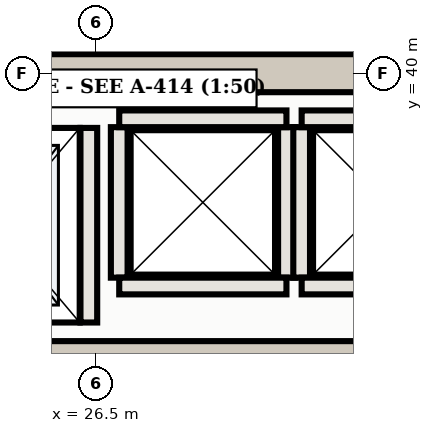
"""IFC4 building model, lengths in metres.
Left out: names, types, materials, properties, quantities, classifications, styles, units other than length and angle.
Written with IfcOpenShell. Run it as: python <this file> out.ifc"""

import sys

from ifc_helpers import new_model, si_unit, direction, frame, frame_2d, origin, place, context, subcontext, project, spatial, rectangle, extrude, element, save


model = new_model("IFC4")
c1 = context("Model", 3, precision=1e-05, world=origin(), true_north=direction((0.0, 1.0)))
c2 = subcontext(c1, "Body", "Model", "MODEL_VIEW")
j1 = project(units=[si_unit("LENGTHUNIT", "METRE"), si_unit("PLANEANGLEUNIT", "RADIAN")], contexts=[c1])
p1 = place(None, origin())
s1 = spatial("IfcSite", under=j1, at=p1, CompositionType="ELEMENT")
p2 = place(p1, origin())
s2 = spatial("IfcBuilding", under=s1, at=p2, CompositionType="ELEMENT")
p3 = place(p2, frame((0.0, 0.0, 223.1)))
s3 = spatial("IfcBuildingStorey", under=s2, at=p3, CompositionType="ELEMENT", Elevation=223.1)
p4 = place(p3, frame((10.35, 40.0, 0.0), z_axis=(0.0, 0.0, 1.0), x_axis=(1.0, 0.0, 0.0)))
e1 = element("IfcWall", 1, at=p4, inside=s3, PredefinedType="SHEAR", context=c2, shape_type="SweptSolid", body=[
    extrude(rectangle(XDim=32.3, YDim=0.5, at=frame_2d((16.15, 0.0))), origin(), (0.0, 0.0, 1.0), 3.11),
])
p5 = place(p3, frame((15.5, 36.3, 0.0), z_axis=(0.0, 0.0, 1.0), x_axis=(1.0, 0.0, 0.0)))
e2 = element("IfcWall", 2, at=p5, inside=s3, PredefinedType="SHEAR", context=c2, shape_type="SweptSolid", body=[
    extrude(rectangle(XDim=22.0, YDim=0.35, at=frame_2d((11.0, 0.0))), origin(), (0.0, 0.0, 1.0), 3.11),
])
p6 = place(p5, frame((0.65, 0.0, 0.0)))
e3 = element("IfcOpeningElement", 3, at=p6, cuts=e2, PredefinedType="OPENING", context=c2, shape_type="SweptSolid", body=[
    extrude(rectangle(XDim=1.1, YDim=2.15, at=frame_2d((0.55, 1.075))), frame((0.0, 0.185, 0.0), z_axis=(0.0, -1.0, 0.0), x_axis=(1.0, 0.0, 0.0)), (0.0, 0.0, 1.0), 0.37),
])
p7 = place(p5, frame((20.25, 0.0, 0.0)))
e4 = element("IfcOpeningElement", 4, at=p7, cuts=e2, PredefinedType="OPENING", context=c2, shape_type="SweptSolid", body=[
    extrude(rectangle(XDim=1.1, YDim=2.15, at=frame_2d((0.55, 1.075))), frame((0.0, 0.185, 0.0), z_axis=(0.0, -1.0, 0.0), x_axis=(1.0, 0.0, 0.0)), (0.0, 0.0, 1.0), 0.37),
])
p8 = place(p5, frame((17.05, 0.0, 0.0)))
e5 = element("IfcOpeningElement", 5, at=p8, cuts=e2, PredefinedType="OPENING", context=c2, shape_type="SweptSolid", body=[
    extrude(rectangle(XDim=1.3, YDim=2.2, at=frame_2d((0.65, 1.1))), frame((0.0, 0.185, 0.0), z_axis=(0.0, -1.0, 0.0), x_axis=(1.0, 0.0, 0.0)), (0.0, 0.0, 1.0), 0.37),
])
p9 = place(p5, frame((3.95, 0.0, 0.0)))
e6 = element("IfcOpeningElement", 6, at=p9, cuts=e2, PredefinedType="OPENING", context=c2, shape_type="SweptSolid", body=[
    extrude(rectangle(XDim=1.1, YDim=2.15, at=frame_2d((0.55, 1.075))), frame((0.0, 0.185, 0.0), z_axis=(0.0, -1.0, 0.0), x_axis=(1.0, 0.0, 0.0)), (0.0, 0.0, 1.0), 0.37),
])
p10 = place(p5, frame((6.55, 0.0, 0.0)))
e7 = element("IfcOpeningElement", 7, at=p10, cuts=e2, PredefinedType="OPENING", context=c2, shape_type="SweptSolid", body=[
    extrude(rectangle(XDim=1.1, YDim=2.15, at=frame_2d((0.55, 1.075))), frame((0.0, 0.185, 0.0), z_axis=(0.0, -1.0, 0.0), x_axis=(1.0, 0.0, 0.0)), (0.0, 0.0, 1.0), 0.37),
])
p11 = place(p5, frame((9.15, 0.0, 0.0)))
e8 = element("IfcOpeningElement", 8, at=p11, cuts=e2, PredefinedType="OPENING", context=c2, shape_type="SweptSolid", body=[
    extrude(rectangle(XDim=1.1, YDim=2.15, at=frame_2d((0.55, 1.075))), frame((0.0, 0.185, 0.0), z_axis=(0.0, -1.0, 0.0), x_axis=(1.0, 0.0, 0.0)), (0.0, 0.0, 1.0), 0.37),
])
p12 = place(p3, frame((26.4, 36.72, 0.0), z_axis=(0.0, 0.0, 1.0), x_axis=(0.0, 1.0, 0.0)))
e9 = element("IfcWall", 9, at=p12, inside=s3, PredefinedType="SOLIDWALL", context=c2, shape_type="SweptSolid", body=[
    extrude(rectangle(XDim=2.56, YDim=0.22, at=frame_2d((1.28, 0.0))), origin(), (0.0, 0.0, 1.0), 3.11),
])
for number, where, z_axis, x_axis in (
    (10, (26.8, 37.31, 0.0), (0.0, 0.0, 1.0), (0.0, 1.0, 0.0)),
    (11, (29.0, 37.31, 0.0), (0.0, 0.0, 1.0), (0.0, 1.0, 0.0)),
):
    element("IfcWall", number, at=place(p3, frame(where, z_axis=z_axis, x_axis=x_axis)), inside=s3, PredefinedType="SOLIDWALL", context=c2, shape_type="SweptSolid", body=[
        extrude(rectangle(XDim=1.98, YDim=0.22, at=frame_2d((0.99, 0.0))), origin(), (0.0, 0.0, 1.0), 3.11),
    ])
for number, where, z_axis, x_axis in (
    (12, (26.8, 39.4, 0.0), (0.0, 0.0, 1.0), (1.0, 0.0, 0.0)),
    (13, (26.8, 37.2, 0.0), (0.0, 0.0, 1.0), (1.0, 0.0, 0.0)),
):
    element("IfcWall", number, at=place(p3, frame(where, z_axis=z_axis, x_axis=x_axis)), inside=s3, PredefinedType="SOLIDWALL", context=c2, shape_type="SweptSolid", body=[
        extrude(rectangle(XDim=2.2, YDim=0.22, at=frame_2d((1.1, 0.0))), origin(), (0.0, 0.0, 1.0), 3.11),
    ])
p13 = place(p3, frame((29.2, 37.31, 0.0), z_axis=(0.0, 0.0, 1.0), x_axis=(0.0, 1.0, 0.0)))
e14 = element("IfcWall", 14, at=p13, inside=s3, PredefinedType="SOLIDWALL", context=c2, shape_type="SweptSolid", body=[
    extrude(rectangle(XDim=1.98, YDim=0.22, at=frame_2d((0.99, 0.0))), origin(), (0.0, 0.0, 1.0), 3.11),
])
for number, where, z_axis, x_axis in (
    (15, (29.2, 39.4, 0.0), (0.0, 0.0, 1.0), (1.0, 0.0, 0.0)),
    (16, (29.2, 37.2, 0.0), (0.0, 0.0, 1.0), (1.0, 0.0, 0.0)),
):
    element("IfcWall", number, at=place(p3, frame(where, z_axis=z_axis, x_axis=x_axis)), inside=s3, PredefinedType="SOLIDWALL", context=c2, shape_type="SweptSolid", body=[
        extrude(rectangle(XDim=2.2, YDim=0.22, at=frame_2d((1.1, 0.0))), origin(), (0.0, 0.0, 1.0), 3.11),
    ])
save(model, sys.argv[1])
